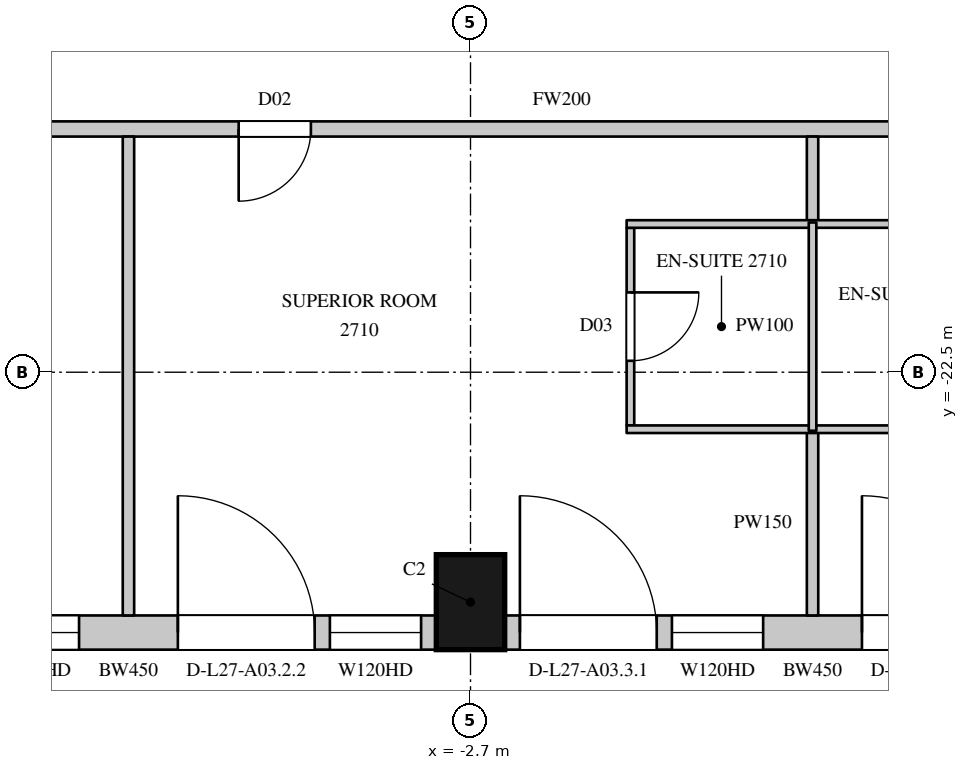
"""IFC4 building model, lengths in metres.
Left out: names, types, materials, properties, quantities, classifications, styles, units other than length and angle.
Written with IfcOpenShell. Run it as: python <this file> out.ifc"""

import sys

from ifc_helpers import new_model, si_unit, direction, frame, frame_2d, origin, origin_2d, place, context, subcontext, project, spatial, rectangle, extrude, element, fill, save


model = new_model("IFC4")
c1 = context("Model", 3, precision=1e-05, world=origin(), true_north=direction((0.0, 1.0)))
c2 = subcontext(c1, "Body", "Model", "MODEL_VIEW")
j1 = project(units=[si_unit("LENGTHUNIT", "METRE"), si_unit("PLANEANGLEUNIT", "RADIAN")], contexts=[c1])
p1 = place(None, origin())
s1 = spatial("IfcSite", under=j1, at=p1, CompositionType="ELEMENT")
p2 = place(p1, origin())
s2 = spatial("IfcBuilding", under=s1, at=p2, CompositionType="ELEMENT")
p3 = place(p2, frame((0.0, 0.0, 127.5)))
s3 = spatial("IfcBuildingStorey", under=s2, at=p3, CompositionType="ELEMENT", Elevation=127.5)
p4 = place(p3, frame((-2.7, -25.525, 0.0), z_axis=(0.0, 0.0, 1.0), x_axis=(1.0, 0.0, 0.0)))
e1 = element("IfcColumn", 1, at=p4, inside=s3, PredefinedType="COLUMN", context=c2, shape_type="SweptSolid", body=[
    extrude(rectangle(XDim=0.9, YDim=1.25, at=origin_2d()), origin(), (0.0, 0.0, 1.0), 3.6),
])
p5 = place(p3, frame((-11.25, -25.925, 0.0), z_axis=(0.0, 0.0, 1.0), x_axis=(1.0, 0.0, 0.0)))
e2 = element("IfcWall", 2, at=p5, inside=s3, PredefinedType="SOLIDWALL", context=c2, shape_type="SweptSolid", body=[
    extrude(rectangle(XDim=8.1, YDim=0.45, at=frame_2d((4.05, 0.0))), origin(), (0.0, 0.0, 1.0), 3.3),
])
p6 = place(p5, frame((0.2, 0.0, 0.0)))
e3 = element("IfcOpeningElement", 3, at=p6, cuts=e2, PredefinedType="OPENING", context=c2, shape_type="SweptSolid", body=[
    extrude(rectangle(XDim=1.8, YDim=2.4, at=frame_2d((0.9, 1.2))), frame((0.0, 0.235, 0.0), z_axis=(0.0, -1.0, 0.0), x_axis=(1.0, 0.0, 0.0)), (0.0, 0.0, 1.0), 0.47),
])
p7 = place(p5, frame((2.2, 0.0, 1.05)))
e4 = element("IfcOpeningElement", 4, at=p7, cuts=e2, PredefinedType="OPENING", context=c2, shape_type="SweptSolid", body=[
    extrude(rectangle(XDim=1.2, YDim=2.0, at=frame_2d((0.6, 1.0))), frame((0.0, 0.235, 0.0), z_axis=(0.0, -1.0, 0.0), x_axis=(1.0, 0.0, 0.0)), (0.0, 0.0, 1.0), 0.47),
])
p8 = place(p5, frame((4.7, 0.0, 0.0)))
e5 = element("IfcOpeningElement", 5, at=p8, cuts=e2, PredefinedType="OPENING", context=c2, shape_type="SweptSolid", body=[
    extrude(rectangle(XDim=1.8, YDim=2.4, at=frame_2d((0.9, 1.2))), frame((0.0, 0.235, 0.0), z_axis=(0.0, -1.0, 0.0), x_axis=(1.0, 0.0, 0.0)), (0.0, 0.0, 1.0), 0.47),
])
p9 = place(p5, frame((6.7, 0.0, 1.05)))
e6 = element("IfcOpeningElement", 6, at=p9, cuts=e2, PredefinedType="OPENING", context=c2, shape_type="SweptSolid", body=[
    extrude(rectangle(XDim=1.2, YDim=2.0, at=frame_2d((0.6, 1.0))), frame((0.0, 0.235, 0.0), z_axis=(0.0, -1.0, 0.0), x_axis=(1.0, 0.0, 0.0)), (0.0, 0.0, 1.0), 0.47),
])
p10 = place(p3, frame((-2.25, -25.925, 0.0), z_axis=(0.0, 0.0, 1.0), x_axis=(1.0, 0.0, 0.0)))
e7 = element("IfcWall", 7, at=p10, inside=s3, PredefinedType="SOLIDWALL", context=c2, shape_type="SweptSolid", body=[
    extrude(rectangle(XDim=8.1, YDim=0.45, at=frame_2d((4.05, 0.0))), origin(), (0.0, 0.0, 1.0), 3.3),
])
p11 = place(p10, frame((0.2, 0.0, 0.0)))
e8 = element("IfcOpeningElement", 8, at=p11, cuts=e7, PredefinedType="OPENING", context=c2, shape_type="SweptSolid", body=[
    extrude(rectangle(XDim=1.8, YDim=2.4, at=frame_2d((0.9, 1.2))), frame((0.0, 0.235, 0.0), z_axis=(0.0, -1.0, 0.0), x_axis=(1.0, 0.0, 0.0)), (0.0, 0.0, 1.0), 0.47),
])
p12 = place(p10, frame((2.2, 0.0, 1.05)))
e9 = element("IfcOpeningElement", 9, at=p12, cuts=e7, PredefinedType="OPENING", context=c2, shape_type="SweptSolid", body=[
    extrude(rectangle(XDim=1.2, YDim=2.0, at=frame_2d((0.6, 1.0))), frame((0.0, 0.235, 0.0), z_axis=(0.0, -1.0, 0.0), x_axis=(1.0, 0.0, 0.0)), (0.0, 0.0, 1.0), 0.47),
])
p13 = place(p10, frame((4.7, 0.0, 0.0)))
e10 = element("IfcOpeningElement", 10, at=p13, cuts=e7, PredefinedType="OPENING", context=c2, shape_type="SweptSolid", body=[
    extrude(rectangle(XDim=1.8, YDim=2.4, at=frame_2d((0.9, 1.2))), frame((0.0, 0.235, 0.0), z_axis=(0.0, -1.0, 0.0), x_axis=(1.0, 0.0, 0.0)), (0.0, 0.0, 1.0), 0.47),
])
p14 = place(p10, frame((6.7, 0.0, 1.05)))
e11 = element("IfcOpeningElement", 11, at=p14, cuts=e7, PredefinedType="OPENING", context=c2, shape_type="SweptSolid", body=[
    extrude(rectangle(XDim=1.2, YDim=2.0, at=frame_2d((0.6, 1.0))), frame((0.0, 0.235, 0.0), z_axis=(0.0, -1.0, 0.0), x_axis=(1.0, 0.0, 0.0)), (0.0, 0.0, 1.0), 0.47),
])
p15 = place(p3, frame((-20.8, -19.3, 0.0), z_axis=(0.0, 0.0, 1.0), x_axis=(1.0, 0.0, 0.0)))
e12 = element("IfcWall", 12, at=p15, inside=s3, PredefinedType="PARTITIONING", context=c2, shape_type="SweptSolid", body=[
    extrude(rectangle(XDim=38.6, YDim=0.2, at=frame_2d((19.3, 0.0))), origin(), (0.0, 0.0, 1.0), 3.3),
])
p16 = place(p15, frame((11.2, 0.0, 0.0)))
e13 = element("IfcOpeningElement", 13, at=p16, cuts=e12, PredefinedType="OPENING", context=c2, shape_type="SweptSolid", body=[
    extrude(rectangle(XDim=0.95, YDim=2.2, at=frame_2d((0.475, 1.1))), frame((0.0, 0.11, 0.0), z_axis=(0.0, -1.0, 0.0), x_axis=(1.0, 0.0, 0.0)), (0.0, 0.0, 1.0), 0.22),
])
p17 = place(p15, frame((15.05, 0.0, 0.0)))
e14 = element("IfcOpeningElement", 14, at=p17, cuts=e12, PredefinedType="OPENING", context=c2, shape_type="SweptSolid", body=[
    extrude(rectangle(XDim=0.95, YDim=2.2, at=frame_2d((0.475, 1.1))), frame((0.0, 0.11, 0.0), z_axis=(0.0, -1.0, 0.0), x_axis=(1.0, 0.0, 0.0)), (0.0, 0.0, 1.0), 0.22),
])
p18 = place(p15, frame((29.2, 0.0, 0.0)))
e15 = element("IfcOpeningElement", 15, at=p18, cuts=e12, PredefinedType="OPENING", context=c2, shape_type="SweptSolid", body=[
    extrude(rectangle(XDim=0.95, YDim=2.2, at=frame_2d((0.475, 1.1))), frame((0.0, 0.11, 0.0), z_axis=(0.0, -1.0, 0.0), x_axis=(1.0, 0.0, 0.0)), (0.0, 0.0, 1.0), 0.22),
])
p19 = place(p15, frame((33.05, 0.0, 0.0)))
e16 = element("IfcOpeningElement", 16, at=p19, cuts=e12, PredefinedType="OPENING", context=c2, shape_type="SweptSolid", body=[
    extrude(rectangle(XDim=0.95, YDim=2.2, at=frame_2d((0.475, 1.1))), frame((0.0, 0.11, 0.0), z_axis=(0.0, -1.0, 0.0), x_axis=(1.0, 0.0, 0.0)), (0.0, 0.0, 1.0), 0.22),
])
p20 = place(p3, frame((-7.2, -25.7, 0.0), z_axis=(0.0, 0.0, 1.0), x_axis=(0.0, 1.0, 0.0)))
e17 = element("IfcWall", 17, at=p20, inside=s3, PredefinedType="PARTITIONING", context=c2, shape_type="SweptSolid", body=[
    extrude(rectangle(XDim=6.3, YDim=0.15, at=frame_2d((3.15, 0.0))), origin(), (0.0, 0.0, 1.0), 2.65),
])
p21 = place(p3, frame((1.8, -25.7, 0.0), z_axis=(0.0, 0.0, 1.0), x_axis=(0.0, 1.0, 0.0)))
e18 = element("IfcWall", 18, at=p21, inside=s3, PredefinedType="PARTITIONING", context=c2, shape_type="SweptSolid", body=[
    extrude(rectangle(XDim=2.43, YDim=0.15, at=frame_2d((1.215, 0.0))), origin(), (0.0, 0.0, 1.0), 2.65),
])
p22 = place(p3, frame((1.8, -20.53, 0.0), z_axis=(0.0, 0.0, 1.0), x_axis=(0.0, 1.0, 0.0)))
e19 = element("IfcWall", 19, at=p22, inside=s3, PredefinedType="PARTITIONING", context=c2, shape_type="SweptSolid", body=[
    extrude(rectangle(XDim=1.13, YDim=0.15, at=frame_2d((0.565, 0.0))), origin(), (0.0, 0.0, 1.0), 2.65),
])
p23 = place(p3, frame((-0.596, -23.2, 0.0), z_axis=(0.0, 0.0, 1.0), x_axis=(0.0, 1.0, 0.0)))
e20 = element("IfcWall", 20, at=p23, inside=s3, PredefinedType="PARTITIONING", context=c2, shape_type="SweptSolid", body=[
    extrude(rectangle(XDim=2.6, YDim=0.1, at=frame_2d((1.3, 0.0))), origin(), (0.0, 0.0, 1.0), 3.3),
])
p24 = place(p23, frame((0.85, 0.0, 0.0)))
e21 = element("IfcOpeningElement", 21, at=p24, cuts=e20, PredefinedType="OPENING", context=c2, shape_type="SweptSolid", body=[
    extrude(rectangle(XDim=0.9, YDim=2.2, at=frame_2d((0.45, 1.1))), frame((0.0, 0.06, 0.0), z_axis=(0.0, -1.0, 0.0), x_axis=(1.0, 0.0, 0.0)), (0.0, 0.0, 1.0), 0.12),
])
p25 = place(p3, frame((-0.646, -23.25, 0.0), z_axis=(0.0, 0.0, 1.0), x_axis=(1.0, 0.0, 0.0)))
e22 = element("IfcWall", 22, at=p25, inside=s3, PredefinedType="PARTITIONING", context=c2, shape_type="SweptSolid", body=[
    extrude(rectangle(XDim=4.892, YDim=0.1, at=frame_2d((2.446, 0.0))), origin(), (0.0, 0.0, 1.0), 3.3),
])
p26 = place(p25, frame((3.75, 0.0, 0.0)))
e23 = element("IfcOpeningElement", 23, at=p26, cuts=e22, PredefinedType="OPENING", context=c2, shape_type="SweptSolid", body=[
    extrude(rectangle(XDim=0.9, YDim=2.2, at=frame_2d((0.45, 1.1))), frame((0.0, 0.06, 0.0), z_axis=(0.0, -1.0, 0.0), x_axis=(1.0, 0.0, 0.0)), (0.0, 0.0, 1.0), 0.12),
])
p27 = place(p3, frame((-0.646, -20.55, 0.0), z_axis=(0.0, 0.0, 1.0), x_axis=(1.0, 0.0, 0.0)))
e24 = element("IfcWall", 24, at=p27, inside=s3, PredefinedType="PARTITIONING", context=c2, shape_type="SweptSolid", body=[
    extrude(rectangle(XDim=4.892, YDim=0.1, at=frame_2d((2.446, 0.0))), origin(), (0.0, 0.0, 1.0), 3.3),
])
p28 = place(p3, frame((1.8, -23.27, 0.0), z_axis=(0.0, 0.0, 1.0), x_axis=(0.0, 1.0, 0.0)))
e25 = element("IfcWall", 25, at=p28, inside=s3, PredefinedType="PARTITIONING", context=c2, shape_type="SweptSolid", body=[
    extrude(rectangle(XDim=2.74, YDim=0.1, at=frame_2d((1.37, 0.0))), origin(), (0.0, 0.0, 1.0), 2.65),
])
p29 = place(p7, origin())
e26 = element("IfcWindow", 26, at=p29, inside=s3, PartitioningType="SINGLE_PANEL", PredefinedType="WINDOW", context=c2, shape_type="SweptSolid", body=[
    extrude(rectangle(XDim=1.2, YDim=2.0, at=frame_2d((0.6, 1.0))), frame((0.0, 0.135, 0.0), z_axis=(0.0, -1.0, 0.0), x_axis=(1.0, 0.0, 0.0)), (0.0, 0.0, 1.0), 0.06),
])
fill(e4, e26)
p30 = place(p8, origin())
e27 = element("IfcDoor", 27, at=p30, inside=s3, OperationType="SLIDING_TO_LEFT", PredefinedType="DOOR", context=c2, shape_type="SweptSolid", body=[
    extrude(rectangle(XDim=1.8, YDim=2.4, at=frame_2d((0.9, 1.2))), frame((0.0, 0.13, 0.0), z_axis=(0.0, -1.0, 0.0), x_axis=(1.0, 0.0, 0.0)), (0.0, 0.0, 1.0), 0.05),
])
fill(e5, e27)
p31 = place(p9, origin())
e28 = element("IfcWindow", 28, at=p31, inside=s3, PartitioningType="SINGLE_PANEL", PredefinedType="WINDOW", context=c2, shape_type="SweptSolid", body=[
    extrude(rectangle(XDim=1.2, YDim=2.0, at=frame_2d((0.6, 1.0))), frame((0.0, 0.135, 0.0), z_axis=(0.0, -1.0, 0.0), x_axis=(1.0, 0.0, 0.0)), (0.0, 0.0, 1.0), 0.06),
])
fill(e6, e28)
p32 = place(p11, origin())
e29 = element("IfcDoor", 29, at=p32, inside=s3, OperationType="SLIDING_TO_LEFT", PredefinedType="DOOR", context=c2, shape_type="SweptSolid", body=[
    extrude(rectangle(XDim=1.8, YDim=2.4, at=frame_2d((0.9, 1.2))), frame((0.0, 0.13, 0.0), z_axis=(0.0, -1.0, 0.0), x_axis=(1.0, 0.0, 0.0)), (0.0, 0.0, 1.0), 0.05),
])
fill(e8, e29)
p33 = place(p12, origin())
e30 = element("IfcWindow", 30, at=p33, inside=s3, PartitioningType="SINGLE_PANEL", PredefinedType="WINDOW", context=c2, shape_type="SweptSolid", body=[
    extrude(rectangle(XDim=1.2, YDim=2.0, at=frame_2d((0.6, 1.0))), frame((0.0, 0.135, 0.0), z_axis=(0.0, -1.0, 0.0), x_axis=(1.0, 0.0, 0.0)), (0.0, 0.0, 1.0), 0.06),
])
fill(e9, e30)
p34 = place(p13, origin())
e31 = element("IfcDoor", 31, at=p34, inside=s3, OperationType="SLIDING_TO_LEFT", PredefinedType="DOOR", context=c2, shape_type="SweptSolid", body=[
    extrude(rectangle(XDim=1.8, YDim=2.4, at=frame_2d((0.9, 1.2))), frame((0.0, 0.13, 0.0), z_axis=(0.0, -1.0, 0.0), x_axis=(1.0, 0.0, 0.0)), (0.0, 0.0, 1.0), 0.05),
])
fill(e10, e31)
p35 = place(p17, origin())
e32 = element("IfcDoor", 32, at=p35, inside=s3, OperationType="SINGLE_SWING_RIGHT", PredefinedType="DOOR", context=c2, shape_type="SweptSolid", body=[
    extrude(rectangle(XDim=0.95, YDim=2.2, at=frame_2d((0.475, 1.1))), frame((0.0, 0.025, 0.0), z_axis=(0.0, -1.0, 0.0), x_axis=(1.0, 0.0, 0.0)), (0.0, 0.0, 1.0), 0.05),
])
fill(e14, e32)
p36 = place(p24, origin())
e33 = element("IfcDoor", 33, at=p36, inside=s3, OperationType="SINGLE_SWING_LEFT", PredefinedType="DOOR", context=c2, shape_type="SweptSolid", body=[
    extrude(rectangle(XDim=0.9, YDim=2.2, at=frame_2d((0.45, 1.1))), frame((0.0, 0.025, 0.0), z_axis=(0.0, -1.0, 0.0), x_axis=(1.0, 0.0, 0.0)), (0.0, 0.0, 1.0), 0.05),
])
fill(e21, e33)
save(model, sys.argv[1])
